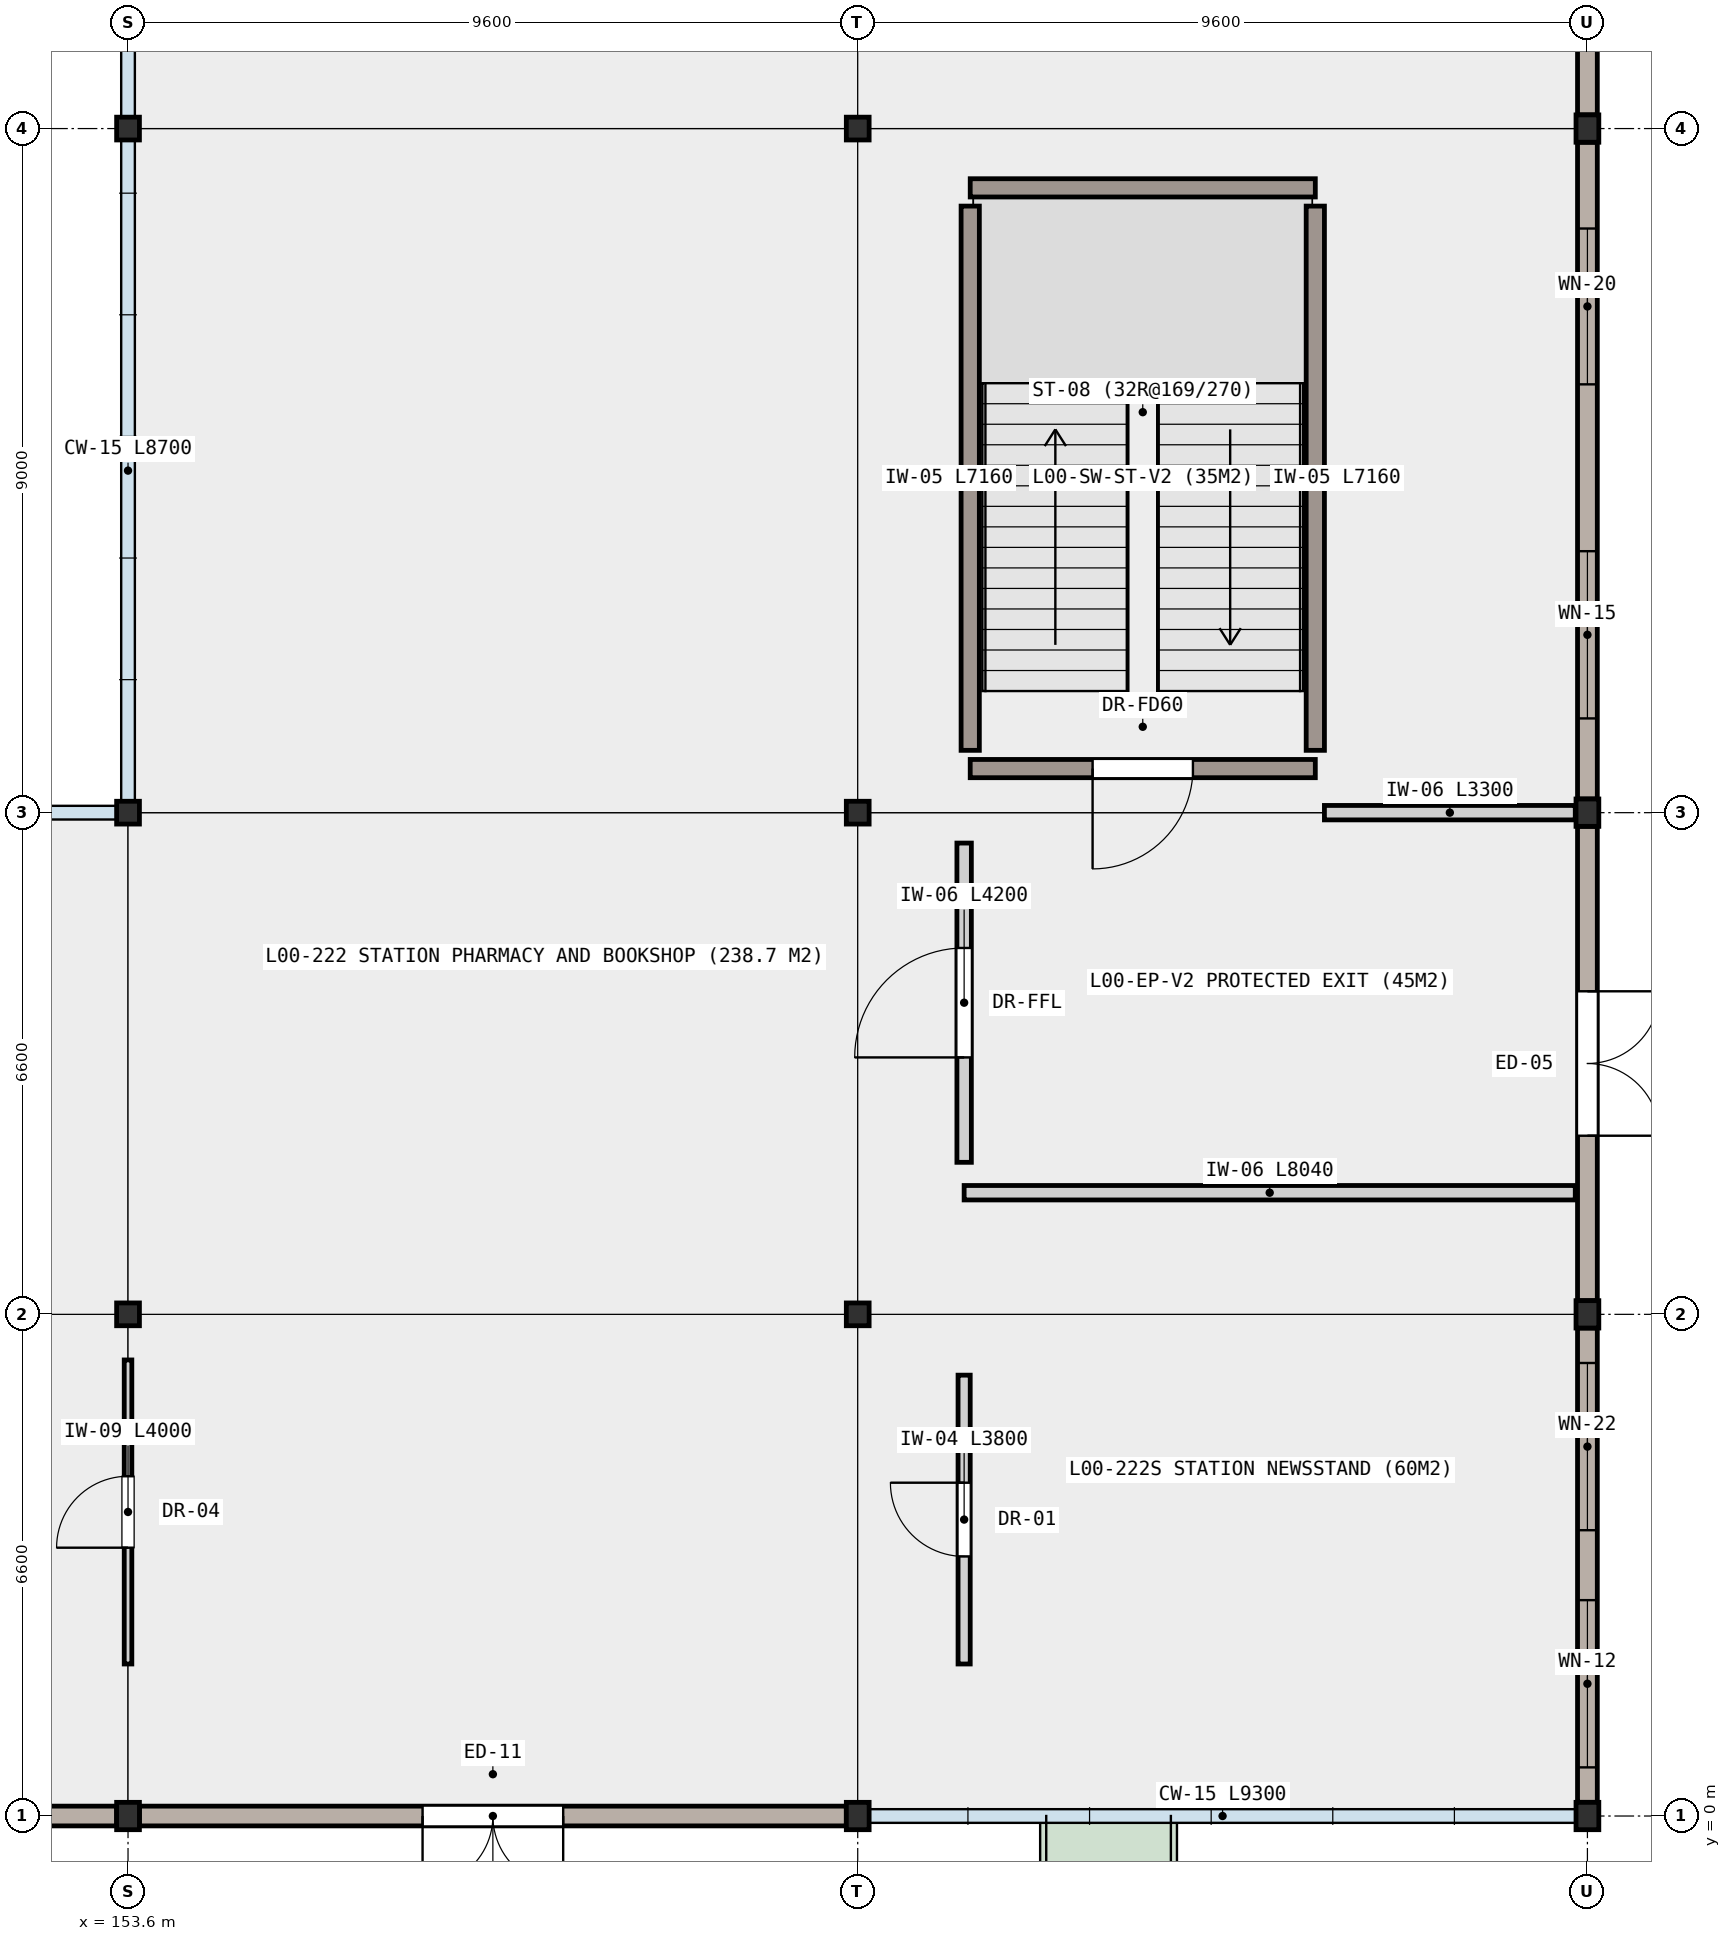
"""IFC4 building model, lengths in metres.
Left out: names, types, materials, properties, quantities, classifications, styles, units other than length and angle.
Written with IfcOpenShell. Run it as: python <this file> out.ifc"""

import sys

from ifc_helpers import new_model, si_unit, direction, frame, frame_2d, origin, origin_2d, place, context, subcontext, project, spatial, rectangle, i_section, extrude, element, fill, save


model = new_model("IFC4")
c1 = context("Model", 3, precision=1e-05, world=origin(), true_north=direction((0.0, 1.0)))
c2 = subcontext(c1, "Body", "Model", "MODEL_VIEW")
j1 = project(units=[si_unit("LENGTHUNIT", "METRE"), si_unit("PLANEANGLEUNIT", "RADIAN")], contexts=[c1])
p1 = place(None, origin())
s1 = spatial("IfcSite", under=j1, at=p1, CompositionType="ELEMENT")
p2 = place(p1, origin())
s2 = spatial("IfcBuilding", under=s1, at=p2, CompositionType="ELEMENT")
p3 = place(p2, origin())
s3 = spatial("IfcBuildingStorey", under=s2, at=p3, CompositionType="ELEMENT", Elevation=0.0)
p4 = place(p3, frame((153.6, 0.0, 0.0), z_axis=(0.0, 0.0, 1.0), x_axis=(1.0, 0.0, 0.0)))
e1 = element("IfcColumn", 1, at=p4, inside=s3, PredefinedType="COLUMN", context=c2, shape_type="SweptSolid", body=[
    extrude(i_section(OverallWidth=0.3, OverallDepth=0.36, WebThickness=0.012, FlangeThickness=0.022, FilletRadius=0.027, at=origin_2d()), origin(), (0.0, 0.0, 1.0), 5.4),
])
for number, where, z_axis, x_axis in (
    (2, (153.6, 6.6, 0.0), (0.0, 0.0, 1.0), (1.0, 0.0, 0.0)),
    (3, (153.6, 13.2, 0.0), (0.0, 0.0, 1.0), (1.0, 0.0, 0.0)),
    (4, (153.6, 22.2, 0.0), (0.0, 0.0, 1.0), (1.0, 0.0, 0.0)),
):
    element("IfcColumn", number, at=place(p3, frame(where, z_axis=z_axis, x_axis=x_axis)), inside=s3, PredefinedType="COLUMN", context=c2, shape_type="SweptSolid", body=[
        extrude(i_section(OverallWidth=0.3, OverallDepth=0.3, WebThickness=0.011, FlangeThickness=0.019, FilletRadius=0.027, at=origin_2d()), origin(), (0.0, 0.0, 1.0), 5.4),
    ])
p5 = place(p3, frame((163.2, 0.0, 0.0), z_axis=(0.0, 0.0, 1.0), x_axis=(1.0, 0.0, 0.0)))
e5 = element("IfcColumn", 5, at=p5, inside=s3, PredefinedType="COLUMN", context=c2, shape_type="SweptSolid", body=[
    extrude(i_section(OverallWidth=0.3, OverallDepth=0.36, WebThickness=0.012, FlangeThickness=0.022, FilletRadius=0.027, at=origin_2d()), origin(), (0.0, 0.0, 1.0), 5.4),
])
for number, where, z_axis, x_axis in (
    (6, (163.2, 6.6, 0.0), (0.0, 0.0, 1.0), (1.0, 0.0, 0.0)),
    (7, (163.2, 13.2, 0.0), (0.0, 0.0, 1.0), (1.0, 0.0, 0.0)),
    (8, (163.2, 22.2, 0.0), (0.0, 0.0, 1.0), (1.0, 0.0, 0.0)),
):
    element("IfcColumn", number, at=place(p3, frame(where, z_axis=z_axis, x_axis=x_axis)), inside=s3, PredefinedType="COLUMN", context=c2, shape_type="SweptSolid", body=[
        extrude(i_section(OverallWidth=0.3, OverallDepth=0.3, WebThickness=0.011, FlangeThickness=0.019, FilletRadius=0.027, at=origin_2d()), origin(), (0.0, 0.0, 1.0), 5.4),
    ])
for number, where, z_axis, x_axis in (
    (9, (172.8, 0.0, 0.0), (0.0, 0.0, 1.0), (1.0, 0.0, 0.0)),
    (10, (172.8, 6.6, 0.0), (0.0, 0.0, 1.0), (1.0, 0.0, 0.0)),
    (11, (172.8, 13.2, 0.0), (0.0, 0.0, 1.0), (1.0, 0.0, 0.0)),
    (12, (172.8, 22.2, 0.0), (0.0, 0.0, 1.0), (1.0, 0.0, 0.0)),
):
    element("IfcColumn", number, at=place(p3, frame(where, z_axis=z_axis, x_axis=x_axis)), inside=s3, PredefinedType="COLUMN", context=c2, shape_type="SweptSolid", body=[
        extrude(i_section(OverallWidth=0.3, OverallDepth=0.36, WebThickness=0.012, FlangeThickness=0.022, FilletRadius=0.027, at=origin_2d()), origin(), (0.0, 0.0, 1.0), 5.4),
    ])
p6 = place(p3, frame((172.8, 31.02, 0.0), z_axis=(0.0, 0.0, 1.0), x_axis=(0.0, -1.0, 0.0)))
e13 = element("IfcWall", 13, at=p6, inside=s3, PredefinedType="SOLIDWALL", context=c2, shape_type="SweptSolid", body=[
    extrude(rectangle(XDim=8.64, YDim=0.26, at=frame_2d((4.32, 0.0))), origin(), (0.0, 0.0, 1.0), 4.6),
])
p7 = place(p6, frame((3.345, 0.0, 0.0)))
e14 = element("IfcOpeningElement", 14, at=p7, cuts=e13, PredefinedType="OPENING", context=c2, shape_type="SweptSolid", body=[
    extrude(rectangle(XDim=1.95, YDim=2.4, at=frame_2d((0.975, 1.2))), frame((0.0, 0.14, 0.0), z_axis=(0.0, -1.0, 0.0), x_axis=(1.0, 0.0, 0.0)), (0.0, 0.0, 1.0), 0.28),
])
p8 = place(p3, frame((172.8, 22.02, 0.0), z_axis=(0.0, 0.0, 1.0), x_axis=(0.0, -1.0, 0.0)))
e15 = element("IfcWall", 15, at=p8, inside=s3, PredefinedType="SOLIDWALL", context=c2, shape_type="SweptSolid", body=[
    extrude(rectangle(XDim=8.64, YDim=0.26, at=frame_2d((4.32, 0.0))), origin(), (0.0, 0.0, 1.0), 4.54),
])
p9 = place(p8, frame((1.135, 0.0, 0.85)))
e16 = element("IfcOpeningElement", 16, at=p9, cuts=e15, PredefinedType="OPENING", context=c2, shape_type="SweptSolid", body=[
    extrude(rectangle(XDim=2.05, YDim=2.15, at=frame_2d((1.025, 1.075))), frame((0.0, 0.14, 0.0), z_axis=(0.0, -1.0, 0.0), x_axis=(1.0, 0.0, 0.0)), (0.0, 0.0, 1.0), 0.28),
])
p10 = place(p8, frame((5.38, 0.0, 0.85)))
e17 = element("IfcOpeningElement", 17, at=p10, cuts=e15, PredefinedType="OPENING", context=c2, shape_type="SweptSolid", body=[
    extrude(rectangle(XDim=2.2, YDim=1.5, at=frame_2d((1.1, 0.75))), frame((0.0, 0.14, 0.0), z_axis=(0.0, -1.0, 0.0), x_axis=(1.0, 0.0, 0.0)), (0.0, 0.0, 1.0), 0.28),
])
p11 = place(p3, frame((172.8, 13.02, 0.0), z_axis=(0.0, 0.0, 1.0), x_axis=(0.0, -1.0, 0.0)))
e18 = element("IfcWall", 18, at=p11, inside=s3, PredefinedType="SOLIDWALL", context=c2, shape_type="SweptSolid", body=[
    extrude(rectangle(XDim=6.24, YDim=0.26, at=frame_2d((3.12, 0.0))), origin(), (0.0, 0.0, 1.0), 4.59),
])
p12 = place(p11, frame((2.17, 0.0, 0.0)))
e19 = element("IfcOpeningElement", 19, at=p12, cuts=e18, PredefinedType="OPENING", context=c2, shape_type="SweptSolid", body=[
    extrude(rectangle(XDim=1.9, YDim=2.4, at=frame_2d((0.95, 1.2))), frame((0.0, 0.14, 0.0), z_axis=(0.0, -1.0, 0.0), x_axis=(1.0, 0.0, 0.0)), (0.0, 0.0, 1.0), 0.28),
])
p13 = place(p3, frame((172.8, 6.42, 0.0), z_axis=(0.0, 0.0, 1.0), x_axis=(0.0, -1.0, 0.0)))
e20 = element("IfcWall", 20, at=p13, inside=s3, PredefinedType="SOLIDWALL", context=c2, shape_type="SweptSolid", body=[
    extrude(rectangle(XDim=6.24, YDim=0.26, at=frame_2d((3.12, 0.0))), origin(), (0.0, 0.0, 1.0), 4.59),
])
p14 = place(p13, frame((0.46, 0.0, 0.85)))
e21 = element("IfcOpeningElement", 21, at=p14, cuts=e20, PredefinedType="OPENING", context=c2, shape_type="SweptSolid", body=[
    extrude(rectangle(XDim=2.2, YDim=1.85, at=frame_2d((1.1, 0.925))), frame((0.0, 0.14, 0.0), z_axis=(0.0, -1.0, 0.0), x_axis=(1.0, 0.0, 0.0)), (0.0, 0.0, 1.0), 0.28),
])
p15 = place(p13, frame((3.58, 0.0, 0.85)))
e22 = element("IfcOpeningElement", 22, at=p15, cuts=e20, PredefinedType="OPENING", context=c2, shape_type="SweptSolid", body=[
    extrude(rectangle(XDim=2.2, YDim=2.15, at=frame_2d((1.1, 1.075))), frame((0.0, 0.14, 0.0), z_axis=(0.0, -1.0, 0.0), x_axis=(1.0, 0.0, 0.0)), (0.0, 0.0, 1.0), 0.28),
])
p16 = place(p3, frame((163.05, 0.0, 0.0), z_axis=(0.0, 0.0, 1.0), x_axis=(-1.0, 0.0, 0.0)))
e23 = element("IfcWall", 23, at=p16, inside=s3, PredefinedType="SOLIDWALL", context=c2, shape_type="SweptSolid", body=[
    extrude(rectangle(XDim=9.3, YDim=0.26, at=frame_2d((4.65, 0.0))), origin(), (0.0, 0.0, 1.0), 4.73),
])
p17 = place(p16, frame((3.725, 0.0, 0.0)))
e24 = element("IfcOpeningElement", 24, at=p17, cuts=e23, PredefinedType="OPENING", context=c2, shape_type="SweptSolid", body=[
    extrude(rectangle(XDim=1.85, YDim=2.35, at=frame_2d((0.925, 1.175))), frame((0.0, 0.14, 0.0), z_axis=(0.0, -1.0, 0.0), x_axis=(1.0, 0.0, 0.0)), (0.0, 0.0, 1.0), 0.28),
])
p18 = place(p3, frame((153.45, 0.0, 0.0), z_axis=(0.0, 0.0, 1.0), x_axis=(-1.0, 0.0, 0.0)))
e25 = element("IfcWall", 25, at=p18, inside=s3, PredefinedType="SOLIDWALL", context=c2, shape_type="SweptSolid", body=[
    extrude(rectangle(XDim=9.3, YDim=0.26, at=frame_2d((4.65, 0.0))), origin(), (0.0, 0.0, 1.0), 4.73),
])
p19 = place(p18, frame((1.15, 0.0, 0.85)))
e26 = element("IfcOpeningElement", 26, at=p19, cuts=e25, PredefinedType="OPENING", context=c2, shape_type="SweptSolid", body=[
    extrude(rectangle(XDim=2.35, YDim=1.5, at=frame_2d((1.175, 0.75))), frame((0.0, 0.14, 0.0), z_axis=(0.0, -1.0, 0.0), x_axis=(1.0, 0.0, 0.0)), (0.0, 0.0, 1.0), 0.28),
])
p20 = place(p18, frame((5.8, 0.0, 0.85)))
e27 = element("IfcOpeningElement", 27, at=p20, cuts=e25, PredefinedType="OPENING", context=c2, shape_type="SweptSolid", body=[
    extrude(rectangle(XDim=2.35, YDim=1.85, at=frame_2d((1.175, 0.925))), frame((0.0, 0.14, 0.0), z_axis=(0.0, -1.0, 0.0), x_axis=(1.0, 0.0, 0.0)), (0.0, 0.0, 1.0), 0.28),
])
p21 = place(p3, frame((169.22, 13.78, 0.0), z_axis=(0.0, 0.0, 1.0), x_axis=(-1.0, 0.0, 0.0)))
e28 = element("IfcWall", 28, at=p21, inside=s3, PredefinedType="SHEAR", context=c2, shape_type="SweptSolid", body=[
    extrude(rectangle(XDim=4.54, YDim=0.24, at=frame_2d((2.27, 0.0))), origin(), (0.0, 0.0, 1.0), 5.12),
])
p22 = place(p21, frame((1.61, 0.0, 0.0)))
e29 = element("IfcOpeningElement", 29, at=p22, cuts=e28, PredefinedType="OPENING", context=c2, shape_type="SweptSolid", body=[
    extrude(rectangle(XDim=1.32, YDim=2.15, at=frame_2d((0.66, 1.075))), frame((0.0, 0.13, 0.0), z_axis=(0.0, -1.0, 0.0), x_axis=(1.0, 0.0, 0.0)), (0.0, 0.0, 1.0), 0.26),
])
p23 = place(p3, frame((164.68, 21.42, 0.0), z_axis=(0.0, 0.0, 1.0), x_axis=(1.0, 0.0, 0.0)))
e30 = element("IfcWall", 30, at=p23, inside=s3, PredefinedType="SHEAR", context=c2, shape_type="SweptSolid", body=[
    extrude(rectangle(XDim=4.54, YDim=0.24, at=frame_2d((2.27, 0.0))), origin(), (0.0, 0.0, 1.0), 5.12),
])
for number, where, z_axis, x_axis in (
    (31, (164.68, 14.02, 0.0), (0.0, 0.0, 1.0), (0.0, 1.0, 0.0)),
    (32, (169.22, 21.18, 0.0), (0.0, 0.0, 1.0), (0.0, -1.0, 0.0)),
):
    element("IfcWall", number, at=place(p3, frame(where, z_axis=z_axis, x_axis=x_axis)), inside=s3, PredefinedType="SHEAR", context=c2, shape_type="SweptSolid", body=[
        extrude(rectangle(XDim=7.16, YDim=0.24, at=frame_2d((3.58, 0.0))), origin(), (0.0, 0.0, 1.0), 5.12),
    ])
p24 = place(p3, frame((164.6, 8.6, 0.0), z_axis=(0.0, 0.0, 1.0), x_axis=(0.0, 1.0, 0.0)))
e33 = element("IfcWall", 33, at=p24, inside=s3, PredefinedType="PARTITIONING", context=c2, shape_type="SweptSolid", body=[
    extrude(rectangle(XDim=4.2, YDim=0.19, at=frame_2d((2.1, 0.0))), origin(), (0.0, 0.0, 1.0), 5.12),
])
p25 = place(p24, frame((1.38, 0.0, 0.0)))
e34 = element("IfcOpeningElement", 34, at=p25, cuts=e33, PredefinedType="OPENING", context=c2, shape_type="SweptSolid", body=[
    extrude(rectangle(XDim=1.44, YDim=2.18, at=frame_2d((0.72, 1.09))), frame((0.0, 0.105, 0.0), z_axis=(0.0, -1.0, 0.0), x_axis=(1.0, 0.0, 0.0)), (0.0, 0.0, 1.0), 0.21),
])
p26 = place(p3, frame((164.6, 8.2, 0.0), z_axis=(0.0, 0.0, 1.0), x_axis=(1.0, 0.0, 0.0)))
e35 = element("IfcWall", 35, at=p26, inside=s3, PredefinedType="PARTITIONING", context=c2, shape_type="SweptSolid", body=[
    extrude(rectangle(XDim=8.04, YDim=0.19, at=frame_2d((4.02, 0.0))), origin(), (0.0, 0.0, 1.0), 5.12),
])
p27 = place(p3, frame((172.64, 13.2, 0.0), z_axis=(0.0, 0.0, 1.0), x_axis=(-1.0, 0.0, 0.0)))
e36 = element("IfcWall", 36, at=p27, inside=s3, PredefinedType="PARTITIONING", context=c2, shape_type="SweptSolid", body=[
    extrude(rectangle(XDim=3.3, YDim=0.19, at=frame_2d((1.65, 0.0))), origin(), (0.0, 0.0, 1.0), 4.49),
])
p28 = place(p3, frame((153.6, 2.0, 0.0), z_axis=(0.0, 0.0, 1.0), x_axis=(0.0, 1.0, 0.0)))
e37 = element("IfcWall", 37, at=p28, inside=s3, PredefinedType="PARTITIONING", context=c2, shape_type="SweptSolid", body=[
    extrude(rectangle(XDim=4.0, YDim=0.1, at=frame_2d((2.0, 0.0))), origin(), (0.0, 0.0, 1.0), 4.59),
])
p29 = place(p28, frame((1.53, 0.0, 0.0)))
e38 = element("IfcOpeningElement", 38, at=p29, cuts=e37, PredefinedType="OPENING", context=c2, shape_type="SweptSolid", body=[
    extrude(rectangle(XDim=0.94, YDim=2.12, at=frame_2d((0.47, 1.06))), frame((0.0, 0.06, 0.0), z_axis=(0.0, -1.0, 0.0), x_axis=(1.0, 0.0, 0.0)), (0.0, 0.0, 1.0), 0.12),
])
p30 = place(p3, frame((164.6, 2.0, 0.0), z_axis=(0.0, 0.0, 1.0), x_axis=(0.0, 1.0, 0.0)))
e39 = element("IfcWall", 39, at=p30, inside=s3, PredefinedType="PARTITIONING", context=c2, shape_type="SweptSolid", body=[
    extrude(rectangle(XDim=3.8, YDim=0.16, at=frame_2d((1.9, 0.0))), origin(), (0.0, 0.0, 1.0), 5.12),
])
p31 = place(p30, frame((1.415, 0.0, 0.0)))
e40 = element("IfcOpeningElement", 40, at=p31, cuts=e39, PredefinedType="OPENING", context=c2, shape_type="SweptSolid", body=[
    extrude(rectangle(XDim=0.97, YDim=2.12, at=frame_2d((0.485, 1.06))), frame((0.0, 0.09, 0.0), z_axis=(0.0, -1.0, 0.0), x_axis=(1.0, 0.0, 0.0)), (0.0, 0.0, 1.0), 0.18),
])
p32 = place(p9, origin())
e41 = element("IfcWindow", 41, at=p32, inside=s3, PartitioningType="SINGLE_PANEL", PredefinedType="WINDOW", context=c2, shape_type="SweptSolid", body=[
    extrude(rectangle(XDim=2.05, YDim=2.15, at=frame_2d((1.025, 1.075))), frame((0.0, 0.03, 0.0), z_axis=(0.0, -1.0, 0.0), x_axis=(1.0, 0.0, 0.0)), (0.0, 0.0, 1.0), 0.06),
])
fill(e16, e41)
p33 = place(p10, origin())
e42 = element("IfcWindow", 42, at=p33, inside=s3, PartitioningType="SINGLE_PANEL", PredefinedType="WINDOW", context=c2, shape_type="SweptSolid", body=[
    extrude(rectangle(XDim=2.2, YDim=1.5, at=frame_2d((1.1, 0.75))), frame((0.0, 0.03, 0.0), z_axis=(0.0, -1.0, 0.0), x_axis=(1.0, 0.0, 0.0)), (0.0, 0.0, 1.0), 0.06),
])
fill(e17, e42)
p34 = place(p12, origin())
e43 = element("IfcDoor", 43, at=p34, inside=s3, OperationType="DOUBLE_DOOR_SINGLE_SWING", PredefinedType="DOOR", context=c2, shape_type="SweptSolid", body=[
    extrude(rectangle(XDim=1.9, YDim=2.4, at=frame_2d((0.95, 1.2))), frame((0.0, 0.025, 0.0), z_axis=(0.0, -1.0, 0.0), x_axis=(1.0, 0.0, 0.0)), (0.0, 0.0, 1.0), 0.05),
])
fill(e19, e43)
p35 = place(p14, origin())
e44 = element("IfcWindow", 44, at=p35, inside=s3, PartitioningType="SINGLE_PANEL", PredefinedType="WINDOW", context=c2, shape_type="SweptSolid", body=[
    extrude(rectangle(XDim=2.2, YDim=1.85, at=frame_2d((1.1, 0.925))), frame((0.0, 0.03, 0.0), z_axis=(0.0, -1.0, 0.0), x_axis=(1.0, 0.0, 0.0)), (0.0, 0.0, 1.0), 0.06),
])
fill(e21, e44)
p36 = place(p15, origin())
e45 = element("IfcWindow", 45, at=p36, inside=s3, PartitioningType="SINGLE_PANEL", PredefinedType="WINDOW", context=c2, shape_type="SweptSolid", body=[
    extrude(rectangle(XDim=2.2, YDim=2.15, at=frame_2d((1.1, 1.075))), frame((0.0, 0.03, 0.0), z_axis=(0.0, -1.0, 0.0), x_axis=(1.0, 0.0, 0.0)), (0.0, 0.0, 1.0), 0.06),
])
fill(e22, e45)
p37 = place(p17, origin())
e46 = element("IfcDoor", 46, at=p37, inside=s3, OperationType="DOUBLE_DOOR_SINGLE_SWING", PredefinedType="DOOR", context=c2, shape_type="SweptSolid", body=[
    extrude(rectangle(XDim=1.85, YDim=2.35, at=frame_2d((0.925, 1.175))), frame((0.0, 0.025, 0.0), z_axis=(0.0, -1.0, 0.0), x_axis=(1.0, 0.0, 0.0)), (0.0, 0.0, 1.0), 0.05),
])
fill(e24, e46)
p38 = place(p22, origin())
e47 = element("IfcDoor", 47, at=p38, inside=s3, OperationType="SINGLE_SWING_RIGHT", PredefinedType="DOOR", context=c2, shape_type="SweptSolid", body=[
    extrude(rectangle(XDim=1.32, YDim=2.15, at=frame_2d((0.66, 1.075))), frame((0.0, 0.025, 0.0), z_axis=(0.0, -1.0, 0.0), x_axis=(1.0, 0.0, 0.0)), (0.0, 0.0, 1.0), 0.05),
])
fill(e29, e47)
p39 = place(p25, origin())
e48 = element("IfcDoor", 48, at=p39, inside=s3, OperationType="SINGLE_SWING_LEFT", PredefinedType="DOOR", context=c2, shape_type="SweptSolid", body=[
    extrude(rectangle(XDim=1.44, YDim=2.18, at=frame_2d((0.72, 1.09))), frame((0.0, 0.025, 0.0), z_axis=(0.0, -1.0, 0.0), x_axis=(1.0, 0.0, 0.0)), (0.0, 0.0, 1.0), 0.05),
])
fill(e34, e48)
p40 = place(p29, origin())
e49 = element("IfcDoor", 49, at=p40, inside=s3, OperationType="SINGLE_SWING_LEFT", PredefinedType="DOOR", context=c2, shape_type="SweptSolid", body=[
    extrude(rectangle(XDim=0.94, YDim=2.12, at=frame_2d((0.47, 1.06))), frame((0.0, 0.025, 0.0), z_axis=(0.0, -1.0, 0.0), x_axis=(1.0, 0.0, 0.0)), (0.0, 0.0, 1.0), 0.05),
])
fill(e38, e49)
p41 = place(p31, origin())
e50 = element("IfcDoor", 50, at=p41, inside=s3, OperationType="SINGLE_SWING_RIGHT", PredefinedType="DOOR", context=c2, shape_type="SweptSolid", body=[
    extrude(rectangle(XDim=0.97, YDim=2.12, at=frame_2d((0.485, 1.06))), frame((0.0, 0.025, 0.0), z_axis=(0.0, -1.0, 0.0), x_axis=(1.0, 0.0, 0.0)), (0.0, 0.0, 1.0), 0.05),
])
fill(e40, e50)
save(model, sys.argv[1])
